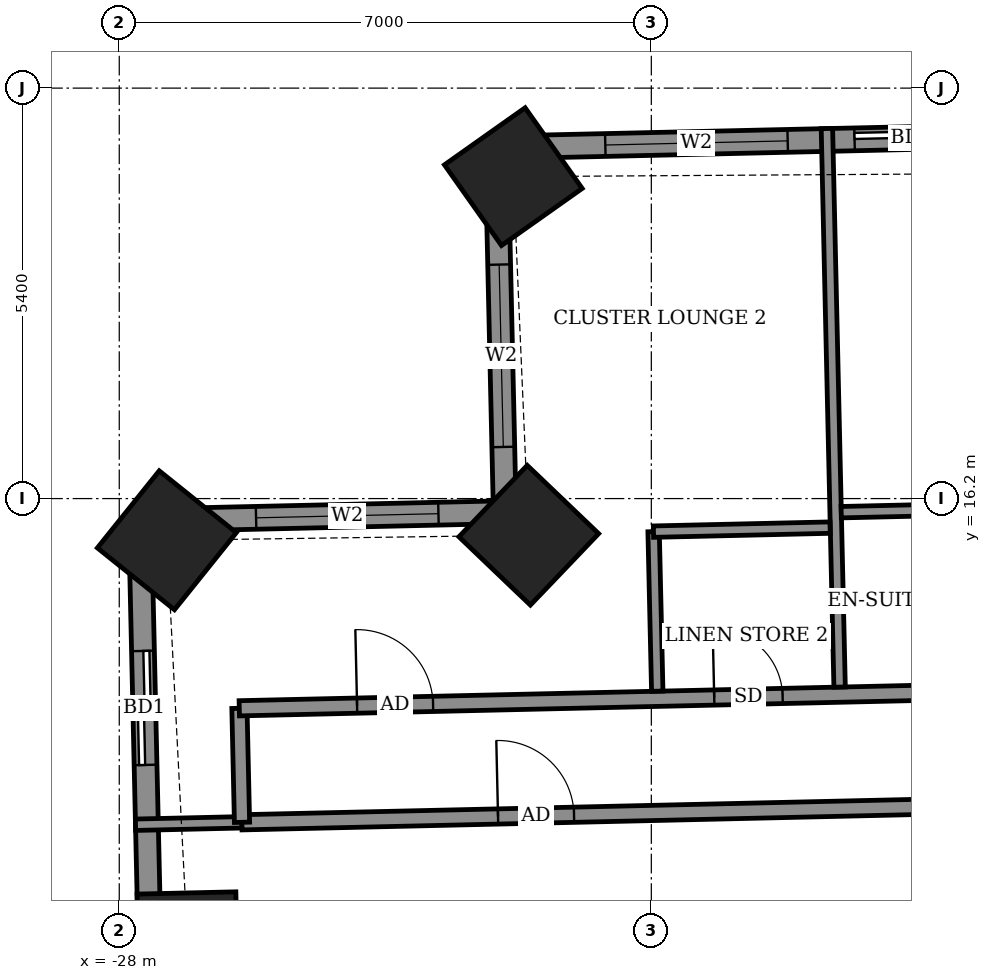
"""IFC4 building model, lengths in metres.
Left out: names, types, materials, properties, quantities, classifications, styles, units other than length and angle.
Written with IfcOpenShell. Run it as: python <this file> out.ifc"""

import sys

from ifc_helpers import new_model, si_unit, direction, frame, frame_2d, origin, origin_2d, place, context, subcontext, project, spatial, rectangle, extrude, element, fill, save


model = new_model("IFC4")
c1 = context("Model", 3, precision=1e-05, world=origin(), true_north=direction((0.0, 1.0)))
c2 = subcontext(c1, "Body", "Model", "MODEL_VIEW")
j1 = project(units=[si_unit("LENGTHUNIT", "METRE"), si_unit("PLANEANGLEUNIT", "RADIAN")], contexts=[c1])
p1 = place(None, origin())
s1 = spatial("IfcSite", under=j1, at=p1, CompositionType="ELEMENT")
p2 = place(p1, origin())
s2 = spatial("IfcBuilding", under=s1, at=p2, CompositionType="ELEMENT")
p3 = place(p2, frame((0.0, 0.0, 144.5)))
s3 = spatial("IfcBuildingStorey", under=s2, at=p3, CompositionType="ELEMENT", Elevation=144.5)
for number, where, z_axis, x_axis in (
    (1, (-22.816, 20.435, -0.55), (0.0, 0.0, 1.0), (-0.816, -0.577, 0.0)),
    (2, (-22.612, 15.718, -0.55), (0.0, 0.0, 1.0), (-0.691, -0.723, 0.0)),
    (3, (-27.374, 15.651, -0.55), (0.0, 0.0, 1.0), (-0.626, -0.78, 0.0)),
    (4, (-27.101, 10.362, -0.55), (0.0, 0.0, 1.0), (0.023, -1.0, 0.0)),
):
    element("IfcColumn", number, at=place(p3, frame(where, z_axis=z_axis, x_axis=x_axis)), inside=s3, PredefinedType="COLUMN", context=c2, shape_type="SweptSolid", body=[
        extrude(rectangle(XDim=1.3, YDim=1.3, at=origin_2d()), origin(), (0.0, 0.0, 1.0), 3.6),
    ])
p4 = place(p3, frame((19.396, 21.782, 0.0), z_axis=(0.0, 0.0, 1.0), x_axis=(-0.999742636707, -0.022686126826, 0.0)))
e5 = element("IfcWall", 5, at=p4, inside=s3, PredefinedType="SOLIDWALL", context=c2, shape_type="SweptSolid", body=[
    extrude(rectangle(XDim=42.444, YDim=0.3, at=frame_2d((21.222, 0.0))), origin(), (0.0, 0.0, 1.0), 3.05),
])
p5 = place(p4, frame((1.757, 0.0, 0.0)))
e6 = element("IfcOpeningElement", 6, at=p5, cuts=e5, PredefinedType="OPENING", context=c2, shape_type="SweptSolid", body=[
    extrude(rectangle(XDim=1.5, YDim=2.4, at=frame_2d((0.75, 1.2))), frame((0.0, 0.16, 0.0), z_axis=(0.0, -1.0, 0.0), x_axis=(1.0, 0.0, 0.0)), (0.0, 0.0, 1.0), 0.32),
])
p6 = place(p4, frame((4.634, 0.0, 0.0)))
e7 = element("IfcOpeningElement", 7, at=p6, cuts=e5, PredefinedType="OPENING", context=c2, shape_type="SweptSolid", body=[
    extrude(rectangle(XDim=1.5, YDim=2.4, at=frame_2d((0.75, 1.2))), frame((0.0, 0.16, 0.0), z_axis=(0.0, -1.0, 0.0), x_axis=(1.0, 0.0, 0.0)), (0.0, 0.0, 1.0), 0.32),
])
p7 = place(p4, frame((9.769, 0.0, 0.0)))
e8 = element("IfcOpeningElement", 8, at=p7, cuts=e5, PredefinedType="OPENING", context=c2, shape_type="SweptSolid", body=[
    extrude(rectangle(XDim=1.5, YDim=2.4, at=frame_2d((0.75, 1.2))), frame((0.0, 0.16, 0.0), z_axis=(0.0, -1.0, 0.0), x_axis=(1.0, 0.0, 0.0)), (0.0, 0.0, 1.0), 0.32),
])
p8 = place(p4, frame((14.946, 0.0, 0.0)))
e9 = element("IfcOpeningElement", 9, at=p8, cuts=e5, PredefinedType="OPENING", context=c2, shape_type="SweptSolid", body=[
    extrude(rectangle(XDim=1.5, YDim=2.4, at=frame_2d((0.75, 1.2))), frame((0.0, 0.16, 0.0), z_axis=(0.0, -1.0, 0.0), x_axis=(1.0, 0.0, 0.0)), (0.0, 0.0, 1.0), 0.32),
])
p9 = place(p4, frame((18.108, 0.0, 0.0)))
e10 = element("IfcOpeningElement", 10, at=p9, cuts=e5, PredefinedType="OPENING", context=c2, shape_type="SweptSolid", body=[
    extrude(rectangle(XDim=1.5, YDim=2.4, at=frame_2d((0.75, 1.2))), frame((0.0, 0.16, 0.0), z_axis=(0.0, -1.0, 0.0), x_axis=(1.0, 0.0, 0.0)), (0.0, 0.0, 1.0), 0.32),
])
p10 = place(p4, frame((22.733, 0.0, 0.0)))
e11 = element("IfcOpeningElement", 11, at=p10, cuts=e5, PredefinedType="OPENING", context=c2, shape_type="SweptSolid", body=[
    extrude(rectangle(XDim=1.5, YDim=2.4, at=frame_2d((0.75, 1.2))), frame((0.0, 0.16, 0.0), z_axis=(0.0, -1.0, 0.0), x_axis=(1.0, 0.0, 0.0)), (0.0, 0.0, 1.0), 0.32),
])
p11 = place(p4, frame((25.895, 0.0, 0.0)))
e12 = element("IfcOpeningElement", 12, at=p11, cuts=e5, PredefinedType="OPENING", context=c2, shape_type="SweptSolid", body=[
    extrude(rectangle(XDim=1.5, YDim=2.4, at=frame_2d((0.75, 1.2))), frame((0.0, 0.16, 0.0), z_axis=(0.0, -1.0, 0.0), x_axis=(1.0, 0.0, 0.0)), (0.0, 0.0, 1.0), 0.32),
])
p12 = place(p4, frame((30.944, 0.0, 0.0)))
e13 = element("IfcOpeningElement", 13, at=p12, cuts=e5, PredefinedType="OPENING", context=c2, shape_type="SweptSolid", body=[
    extrude(rectangle(XDim=1.5, YDim=2.4, at=frame_2d((0.75, 1.2))), frame((0.0, 0.16, 0.0), z_axis=(0.0, -1.0, 0.0), x_axis=(1.0, 0.0, 0.0)), (0.0, 0.0, 1.0), 0.32),
])
p13 = place(p4, frame((36.232, 0.0, 0.0)))
e14 = element("IfcOpeningElement", 14, at=p13, cuts=e5, PredefinedType="OPENING", context=c2, shape_type="SweptSolid", body=[
    extrude(rectangle(XDim=1.5, YDim=2.4, at=frame_2d((0.75, 1.2))), frame((0.0, 0.16, 0.0), z_axis=(0.0, -1.0, 0.0), x_axis=(1.0, 0.0, 0.0)), (0.0, 0.0, 1.0), 0.32),
])
p14 = place(p4, frame((38.612, 0.0, 0.9)))
e15 = element("IfcOpeningElement", 15, at=p14, cuts=e5, PredefinedType="OPENING", context=c2, shape_type="SweptSolid", body=[
    extrude(rectangle(XDim=2.4, YDim=1.5, at=frame_2d((1.2, 0.75))), frame((0.0, 0.16, 0.0), z_axis=(0.0, -1.0, 0.0), x_axis=(1.0, 0.0, 0.0)), (0.0, 0.0, 1.0), 0.32),
])
p15 = place(p3, frame((-23.037, 20.819, 0.0), z_axis=(0.0, 0.0, 1.0), x_axis=(0.022738738327, -0.999741441463, 0.0)))
e16 = element("IfcWall", 16, at=p15, inside=s3, PredefinedType="SOLIDWALL", context=c2, shape_type="SweptSolid", body=[
    extrude(rectangle(XDim=4.799, YDim=0.3, at=frame_2d((2.4, 0.0))), origin(), (0.0, 0.0, 1.0), 2.55),
])
p16 = place(p15, frame((1.541, 0.0, 0.9)))
e17 = element("IfcOpeningElement", 17, at=p16, cuts=e16, PredefinedType="OPENING", context=c2, shape_type="SweptSolid", body=[
    extrude(rectangle(XDim=2.4, YDim=1.5, at=frame_2d((1.2, 0.75))), frame((0.0, 0.16, 0.0), z_axis=(0.0, -1.0, 0.0), x_axis=(1.0, 0.0, 0.0)), (0.0, 0.0, 1.0), 0.32),
])
p17 = place(p3, frame((-22.928, 16.021, 0.0), z_axis=(0.0, 0.0, 1.0), x_axis=(-0.999742701292, -0.022683280499, 0.0)))
e18 = element("IfcWall", 18, at=p17, inside=s3, PredefinedType="SOLIDWALL", context=c2, shape_type="SweptSolid", body=[
    extrude(rectangle(XDim=4.8, YDim=0.3, at=frame_2d((2.4, 0.0))), origin(), (0.0, 0.0, 1.0), 2.55),
])
p18 = place(p17, frame((0.873, 0.0, 0.9)))
e19 = element("IfcOpeningElement", 19, at=p18, cuts=e18, PredefinedType="OPENING", context=c2, shape_type="SweptSolid", body=[
    extrude(rectangle(XDim=2.4, YDim=1.5, at=frame_2d((1.2, 0.75))), frame((0.0, 0.16, 0.0), z_axis=(0.0, -1.0, 0.0), x_axis=(1.0, 0.0, 0.0)), (0.0, 0.0, 1.0), 0.32),
])
p19 = place(p3, frame((-27.727, 15.912, 0.0), z_axis=(0.0, 0.0, 1.0), x_axis=(0.022690078929, -0.999742547018, 0.0)))
e20 = element("IfcWall", 20, at=p19, inside=s3, PredefinedType="SOLIDWALL", context=c2, shape_type="SweptSolid", body=[
    extrude(rectangle(XDim=11.33, YDim=0.3, at=frame_2d((5.665, 0.0))), origin(), (0.0, 0.0, 1.0), 3.05),
])
p20 = place(p19, frame((1.717, 0.0, 0.0)))
e21 = element("IfcOpeningElement", 21, at=p20, cuts=e20, PredefinedType="OPENING", context=c2, shape_type="SweptSolid", body=[
    extrude(rectangle(XDim=1.5, YDim=2.4, at=frame_2d((0.75, 1.2))), frame((0.0, 0.16, 0.0), z_axis=(0.0, -1.0, 0.0), x_axis=(1.0, 0.0, 0.0)), (0.0, 0.0, 1.0), 0.32),
])
p21 = place(p19, frame((7.725, 0.0, 0.9)))
e22 = element("IfcOpeningElement", 22, at=p21, cuts=e20, PredefinedType="OPENING", context=c2, shape_type="SweptSolid", body=[
    extrude(rectangle(XDim=2.4, YDim=1.5, at=frame_2d((1.2, 0.75))), frame((0.0, 0.16, 0.0), z_axis=(0.0, -1.0, 0.0), x_axis=(1.0, 0.0, 0.0)), (0.0, 0.0, 1.0), 0.32),
])
p22 = place(p3, frame((-27.786, 11.909, 0.0), z_axis=(0.0, 0.0, 1.0), x_axis=(0.999740216184, 0.022792545827, 0.0)))
e23 = element("IfcWall", 23, at=p22, inside=s3, PredefinedType="PARTITIONING", context=c2, shape_type="SweptSolid", body=[
    extrude(rectangle(XDim=1.403, YDim=0.15, at=frame_2d((0.702, 0.0))), origin(), (0.0, 0.0, 1.0), 2.55),
])
p23 = place(p3, frame((-26.387, 11.941, 0.0), z_axis=(0.0, 0.0, 1.0), x_axis=(0.999741076645, 0.022754772455, 0.0)))
e24 = element("IfcWall", 24, at=p23, inside=s3, PredefinedType="PARTITIONING", context=c2, shape_type="SweptSolid", body=[
    extrude(rectangle(XDim=9.141, YDim=0.2, at=frame_2d((4.571, 0.0))), origin(), (0.0, 0.0, 1.0), 3.05),
])
p24 = place(p23, frame((3.371, 0.0, 0.0)))
e25 = element("IfcOpeningElement", 25, at=p24, cuts=e24, PredefinedType="OPENING", context=c2, shape_type="SweptSolid", body=[
    extrude(rectangle(XDim=1.0, YDim=2.1, at=frame_2d((0.5, 1.05))), frame((0.0, 0.11, 0.0), z_axis=(0.0, -1.0, 0.0), x_axis=(1.0, 0.0, 0.0)), (0.0, 0.0, 1.0), 0.22),
])
p25 = place(p3, frame((-26.385, 11.941, 0.0), z_axis=(0.0, 0.0, 1.0), x_axis=(-0.022617910375, 0.999744182344, 0.0)))
e26 = element("IfcWall", 26, at=p25, inside=s3, PredefinedType="PARTITIONING", context=c2, shape_type="SweptSolid", body=[
    extrude(rectangle(XDim=1.5, YDim=0.2, at=frame_2d((0.75, 0.0))), origin(), (0.0, 0.0, 1.0), 3.05),
])
p26 = place(p3, frame((-26.421, 13.441, 0.0), z_axis=(0.0, 0.0, 1.0), x_axis=(0.999742754064, 0.022680954485, 0.0)))
e27 = element("IfcWall", 27, at=p26, inside=s3, PredefinedType="PARTITIONING", context=c2, shape_type="SweptSolid", body=[
    extrude(rectangle(XDim=48.945, YDim=0.2, at=frame_2d((24.472, 0.0))), origin(), (0.0, 0.0, 1.0), 3.05),
])
p27 = place(p26, frame((46.772, 0.0, 0.0)))
e28 = element("IfcOpeningElement", 28, at=p27, cuts=e27, PredefinedType="OPENING", context=c2, shape_type="SweptSolid", body=[
    extrude(rectangle(XDim=1.0, YDim=2.1, at=frame_2d((0.5, 1.05))), frame((0.0, 0.11, 0.0), z_axis=(0.0, -1.0, 0.0), x_axis=(1.0, 0.0, 0.0)), (0.0, 0.0, 1.0), 0.22),
])
p28 = place(p26, frame((42.55, 0.0, 0.0)))
e29 = element("IfcOpeningElement", 29, at=p28, cuts=e27, PredefinedType="OPENING", context=c2, shape_type="SweptSolid", body=[
    extrude(rectangle(XDim=0.9, YDim=2.1, at=frame_2d((0.45, 1.05))), frame((0.0, 0.11, 0.0), z_axis=(0.0, -1.0, 0.0), x_axis=(1.0, 0.0, 0.0)), (0.0, 0.0, 1.0), 0.22),
])
p29 = place(p26, frame((38.05, 0.0, 0.0)))
e30 = element("IfcOpeningElement", 30, at=p29, cuts=e27, PredefinedType="OPENING", context=c2, shape_type="SweptSolid", body=[
    extrude(rectangle(XDim=0.9, YDim=2.1, at=frame_2d((0.45, 1.05))), frame((0.0, 0.11, 0.0), z_axis=(0.0, -1.0, 0.0), x_axis=(1.0, 0.0, 0.0)), (0.0, 0.0, 1.0), 0.22),
])
p30 = place(p26, frame((36.225, 0.0, 0.0)))
e31 = element("IfcOpeningElement", 31, at=p30, cuts=e27, PredefinedType="OPENING", context=c2, shape_type="SweptSolid", body=[
    extrude(rectangle(XDim=0.9, YDim=2.1, at=frame_2d((0.45, 1.05))), frame((0.0, 0.11, 0.0), z_axis=(0.0, -1.0, 0.0), x_axis=(1.0, 0.0, 0.0)), (0.0, 0.0, 1.0), 0.22),
])
p31 = place(p26, frame((29.575, 0.0, 0.0)))
e32 = element("IfcOpeningElement", 32, at=p31, cuts=e27, PredefinedType="OPENING", context=c2, shape_type="SweptSolid", body=[
    extrude(rectangle(XDim=0.9, YDim=2.1, at=frame_2d((0.45, 1.05))), frame((0.0, 0.11, 0.0), z_axis=(0.0, -1.0, 0.0), x_axis=(1.0, 0.0, 0.0)), (0.0, 0.0, 1.0), 0.22),
])
p32 = place(p26, frame((27.75, 0.0, 0.0)))
e33 = element("IfcOpeningElement", 33, at=p32, cuts=e27, PredefinedType="OPENING", context=c2, shape_type="SweptSolid", body=[
    extrude(rectangle(XDim=0.9, YDim=2.1, at=frame_2d((0.45, 1.05))), frame((0.0, 0.11, 0.0), z_axis=(0.0, -1.0, 0.0), x_axis=(1.0, 0.0, 0.0)), (0.0, 0.0, 1.0), 0.22),
])
p33 = place(p26, frame((21.125, 0.0, 0.0)))
e34 = element("IfcOpeningElement", 34, at=p33, cuts=e27, PredefinedType="OPENING", context=c2, shape_type="SweptSolid", body=[
    extrude(rectangle(XDim=0.9, YDim=2.1, at=frame_2d((0.45, 1.05))), frame((0.0, 0.11, 0.0), z_axis=(0.0, -1.0, 0.0), x_axis=(1.0, 0.0, 0.0)), (0.0, 0.0, 1.0), 0.22),
])
p34 = place(p26, frame((19.275, 0.0, 0.0)))
e35 = element("IfcOpeningElement", 35, at=p34, cuts=e27, PredefinedType="OPENING", context=c2, shape_type="SweptSolid", body=[
    extrude(rectangle(XDim=0.9, YDim=2.1, at=frame_2d((0.45, 1.05))), frame((0.0, 0.11, 0.0), z_axis=(0.0, -1.0, 0.0), x_axis=(1.0, 0.0, 0.0)), (0.0, 0.0, 1.0), 0.22),
])
p35 = place(p26, frame((12.65, 0.0, 0.0)))
e36 = element("IfcOpeningElement", 36, at=p35, cuts=e27, PredefinedType="OPENING", context=c2, shape_type="SweptSolid", body=[
    extrude(rectangle(XDim=0.9, YDim=2.1, at=frame_2d((0.45, 1.05))), frame((0.0, 0.11, 0.0), z_axis=(0.0, -1.0, 0.0), x_axis=(1.0, 0.0, 0.0)), (0.0, 0.0, 1.0), 0.22),
])
p36 = place(p26, frame((10.8, 0.0, 0.0)))
e37 = element("IfcOpeningElement", 37, at=p36, cuts=e27, PredefinedType="OPENING", context=c2, shape_type="SweptSolid", body=[
    extrude(rectangle(XDim=0.9, YDim=2.1, at=frame_2d((0.45, 1.05))), frame((0.0, 0.11, 0.0), z_axis=(0.0, -1.0, 0.0), x_axis=(1.0, 0.0, 0.0)), (0.0, 0.0, 1.0), 0.22),
])
p37 = place(p26, frame((1.55, 0.0, 0.0)))
e38 = element("IfcOpeningElement", 38, at=p37, cuts=e27, PredefinedType="OPENING", context=c2, shape_type="SweptSolid", body=[
    extrude(rectangle(XDim=1.0, YDim=2.1, at=frame_2d((0.5, 1.05))), frame((0.0, 0.11, 0.0), z_axis=(0.0, -1.0, 0.0), x_axis=(1.0, 0.0, 0.0)), (0.0, 0.0, 1.0), 0.22),
])
p38 = place(p26, frame((6.25, 0.0, 0.0)))
e39 = element("IfcOpeningElement", 39, at=p38, cuts=e27, PredefinedType="OPENING", context=c2, shape_type="SweptSolid", body=[
    extrude(rectangle(XDim=0.9, YDim=2.1, at=frame_2d((0.45, 1.05))), frame((0.0, 0.11, 0.0), z_axis=(0.0, -1.0, 0.0), x_axis=(1.0, 0.0, 0.0)), (0.0, 0.0, 1.0), 0.22),
])
p39 = place(p3, frame((-20.922, 13.666, 0.0), z_axis=(0.0, 0.0, 1.0), x_axis=(-0.022792727877, 0.999740212033, 0.0)))
e40 = element("IfcWall", 40, at=p39, inside=s3, PredefinedType="PARTITIONING", context=c2, shape_type="SweptSolid", body=[
    extrude(rectangle(XDim=2.099, YDim=0.15, at=frame_2d((1.05, 0.0))), origin(), (0.0, 0.0, 1.0), 3.05),
])
p40 = place(p3, frame((-18.523, 13.72, 0.0), z_axis=(0.0, 0.0, 1.0), x_axis=(-0.022719896304, 0.99974186984, 0.0)))
e41 = element("IfcWall", 41, at=p40, inside=s3, PredefinedType="PARTITIONING", context=c2, shape_type="SweptSolid", body=[
    extrude(rectangle(XDim=7.35, YDim=0.15, at=frame_2d((3.675, 0.0))), origin(), (0.0, 0.0, 1.0), 2.55),
])
for number, where, z_axis, x_axis in (
    (42, (-20.972, 15.765, 0.0), (0.0, 0.0, 1.0), (1.0, 0.023, 0.0)),
    (43, (-18.502, 16.021, 0.0), (0.0, 0.0, 1.0), (1.0, 0.023, 0.0)),
):
    element("IfcWall", number, at=place(p3, frame(where, z_axis=z_axis, x_axis=x_axis)), inside=s3, PredefinedType="PARTITIONING", context=c2, shape_type="SweptSolid", body=[
        extrude(rectangle(XDim=2.324, YDim=0.15, at=frame_2d((1.162, 0.0))), origin(), (0.0, 0.0, 1.0), 3.05),
    ])
p41 = place(p13, origin())
e44 = element("IfcDoor", 44, at=p41, inside=s3, OperationType="SLIDING_TO_LEFT", PredefinedType="DOOR", context=c2, shape_type="SweptSolid", body=[
    extrude(rectangle(XDim=1.5, YDim=2.4, at=frame_2d((0.75, 1.2))), frame((0.0, 0.025, 0.0), z_axis=(0.0, -1.0, 0.0), x_axis=(1.0, 0.0, 0.0)), (0.0, 0.0, 1.0), 0.05),
])
fill(e14, e44)
p42 = place(p14, origin())
e45 = element("IfcWindow", 45, at=p42, inside=s3, PartitioningType="DOUBLE_PANEL_VERTICAL", PredefinedType="WINDOW", context=c2, shape_type="SweptSolid", body=[
    extrude(rectangle(XDim=2.4, YDim=1.5, at=frame_2d((1.2, 0.75))), frame((0.0, 0.03, 0.0), z_axis=(0.0, -1.0, 0.0), x_axis=(1.0, 0.0, 0.0)), (0.0, 0.0, 1.0), 0.06),
])
fill(e15, e45)
p43 = place(p16, origin())
e46 = element("IfcWindow", 46, at=p43, inside=s3, PartitioningType="DOUBLE_PANEL_VERTICAL", PredefinedType="WINDOW", context=c2, shape_type="SweptSolid", body=[
    extrude(rectangle(XDim=2.4, YDim=1.5, at=frame_2d((1.2, 0.75))), frame((0.0, 0.03, 0.0), z_axis=(0.0, -1.0, 0.0), x_axis=(1.0, 0.0, 0.0)), (0.0, 0.0, 1.0), 0.06),
])
fill(e17, e46)
p44 = place(p18, origin())
e47 = element("IfcWindow", 47, at=p44, inside=s3, PartitioningType="DOUBLE_PANEL_VERTICAL", PredefinedType="WINDOW", context=c2, shape_type="SweptSolid", body=[
    extrude(rectangle(XDim=2.4, YDim=1.5, at=frame_2d((1.2, 0.75))), frame((0.0, 0.03, 0.0), z_axis=(0.0, -1.0, 0.0), x_axis=(1.0, 0.0, 0.0)), (0.0, 0.0, 1.0), 0.06),
])
fill(e19, e47)
p45 = place(p20, origin())
e48 = element("IfcDoor", 48, at=p45, inside=s3, OperationType="SLIDING_TO_LEFT", PredefinedType="DOOR", context=c2, shape_type="SweptSolid", body=[
    extrude(rectangle(XDim=1.5, YDim=2.4, at=frame_2d((0.75, 1.2))), frame((0.0, 0.025, 0.0), z_axis=(0.0, -1.0, 0.0), x_axis=(1.0, 0.0, 0.0)), (0.0, 0.0, 1.0), 0.05),
])
fill(e21, e48)
p46 = place(p37, origin())
e49 = element("IfcDoor", 49, at=p46, inside=s3, OperationType="SINGLE_SWING_LEFT", PredefinedType="DOOR", context=c2, shape_type="SweptSolid", body=[
    extrude(rectangle(XDim=1.0, YDim=2.1, at=frame_2d((0.5, 1.05))), frame((0.0, 0.025, 0.0), z_axis=(0.0, -1.0, 0.0), x_axis=(1.0, 0.0, 0.0)), (0.0, 0.0, 1.0), 0.05),
])
fill(e38, e49)
p47 = place(p38, origin())
e50 = element("IfcDoor", 50, at=p47, inside=s3, OperationType="SINGLE_SWING_RIGHT", PredefinedType="DOOR", context=c2, shape_type="SweptSolid", body=[
    extrude(rectangle(XDim=0.9, YDim=2.1, at=frame_2d((0.45, 1.05))), frame((0.0, 0.025, 0.0), z_axis=(0.0, -1.0, 0.0), x_axis=(1.0, 0.0, 0.0)), (0.0, 0.0, 1.0), 0.05),
])
fill(e39, e50)
p48 = place(p24, origin())
e51 = element("IfcDoor", 51, at=p48, inside=s3, OperationType="SINGLE_SWING_RIGHT", PredefinedType="DOOR", context=c2, shape_type="SweptSolid", body=[
    extrude(rectangle(XDim=1.0, YDim=2.1, at=frame_2d((0.5, 1.05))), frame((0.0, 0.025, 0.0), z_axis=(0.0, -1.0, 0.0), x_axis=(1.0, 0.0, 0.0)), (0.0, 0.0, 1.0), 0.05),
])
fill(e25, e51)
save(model, sys.argv[1])
